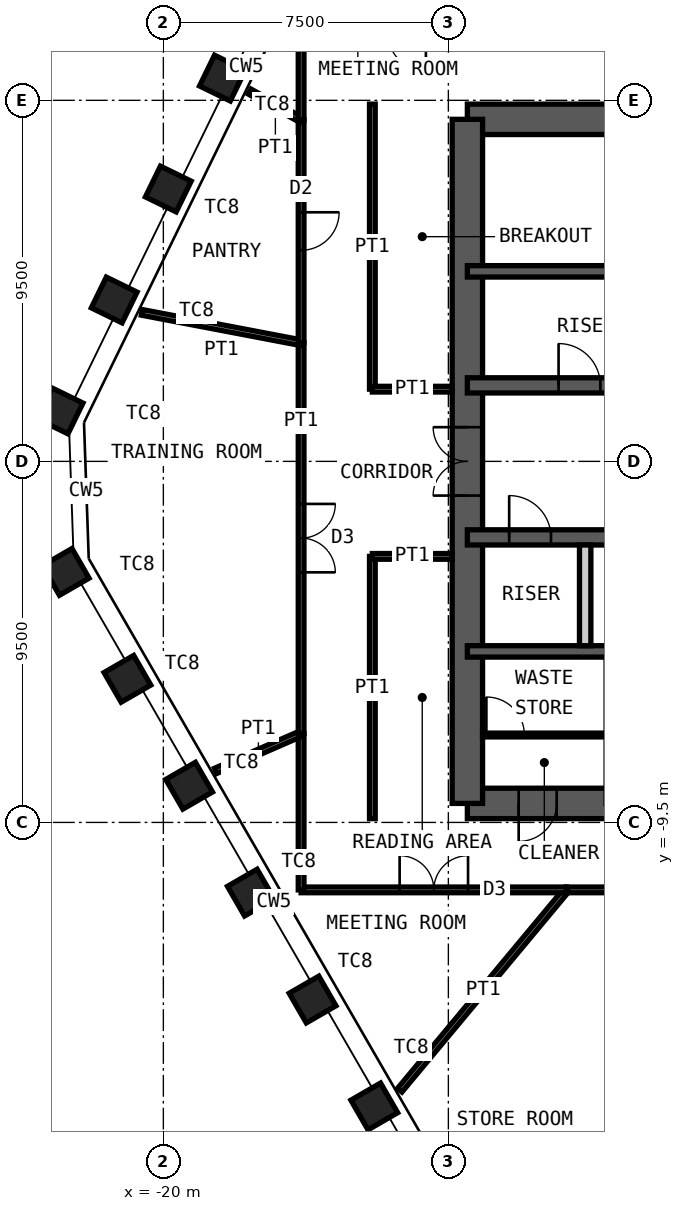
"""IFC4 building model, lengths in metres.
Left out: names, types, materials, properties, quantities, classifications, styles, units other than length and angle.
Written with IfcOpenShell. Run it as: python <this file> out.ifc"""

import sys

from ifc_helpers import new_model, si_unit, direction, frame, frame_2d, origin, origin_2d, place, context, subcontext, project, spatial, rectangle, hollow_rectangle, extrude, element, fill, save


model = new_model("IFC4")
c1 = context("Model", 3, precision=1e-05, world=origin(), true_north=direction((0.0, 1.0)))
c2 = subcontext(c1, "Body", "Model", "MODEL_VIEW")
j1 = project(units=[si_unit("LENGTHUNIT", "METRE"), si_unit("PLANEANGLEUNIT", "RADIAN")], contexts=[c1])
p1 = place(None, origin())
s1 = spatial("IfcSite", under=j1, at=p1, CompositionType="ELEMENT")
p2 = place(p1, origin())
s2 = spatial("IfcBuilding", under=s1, at=p2, CompositionType="ELEMENT")
p3 = place(p2, frame((0.0, 0.0, 308.2)))
s3 = spatial("IfcBuildingStorey", under=s2, at=p3, CompositionType="ELEMENT", Elevation=308.2)
for number, where, z_axis, x_axis in (
    (1, (-14.449, -16.973, 0.0), (0.0, 0.0, 1.0), (0.5, -0.866, 0.0)),
    (2, (-16.073, -14.16, 0.0), (0.0, 0.0, 1.0), (0.5, -0.866, 0.0)),
    (3, (-17.698, -11.347, 0.0), (0.0, 0.0, 1.0), (0.5, -0.866, 0.0)),
    (4, (-19.322, -8.534, 0.0), (0.0, 0.0, 1.0), (0.5, -0.866, 0.0)),
    (5, (-20.946, -5.721, 0.0), (0.0, 0.0, 1.0), (0.5, -0.866, 0.0)),
    (6, (-22.57, -2.908, 0.0), (0.0, 0.0, 1.0), (0.5, -0.866, 0.0)),
    (7, (-22.717, 1.327, 0.0), (0.0, 0.0, 1.0), (-0.438, -0.899, 0.0)),
    (8, (-21.293, 4.246, 0.0), (0.0, 0.0, 1.0), (-0.438, -0.899, 0.0)),
    (9, (-19.87, 7.166, 0.0), (0.0, 0.0, 1.0), (-0.438, -0.899, 0.0)),
    (10, (-18.446, 10.085, 0.0), (0.0, 0.0, 1.0), (-0.438, -0.899, 0.0)),
):
    element("IfcColumn", number, at=place(p3, frame(where, z_axis=z_axis, x_axis=x_axis)), inside=s3, PredefinedType="COLUMN", context=c2, shape_type="SweptSolid", body=[
        extrude(hollow_rectangle(XDim=0.9, YDim=0.9, WallThickness=0.05, at=origin_2d()), origin(), (0.0, 0.0, 1.0), 4.2),
    ])
p4 = place(p3, frame((-12.0, 9.0, 0.0), z_axis=(0.0, 0.0, 1.0), x_axis=(1.0, 0.0, 0.0)))
e11 = element("IfcWall", 11, at=p4, inside=s3, PredefinedType="SHEAR", context=c2, shape_type="SweptSolid", body=[
    extrude(rectangle(XDim=24.0, YDim=0.8, at=frame_2d((12.0, 0.0))), origin(), (0.0, 0.0, 1.0), 4.2),
])
p5 = place(p4, frame((10.4, 0.0, 0.0)))
e12 = element("IfcOpeningElement", 12, at=p5, cuts=e11, PredefinedType="OPENING", context=c2, shape_type="SweptSolid", body=[
    extrude(rectangle(XDim=1.0, YDim=2.1, at=frame_2d((0.5, 1.05))), frame((0.0, 0.41, 0.0), z_axis=(0.0, -1.0, 0.0), x_axis=(1.0, 0.0, 0.0)), (0.0, 0.0, 1.0), 0.82),
])
p6 = place(p4, frame((17.6, 0.0, 0.0)))
e13 = element("IfcOpeningElement", 13, at=p6, cuts=e11, PredefinedType="OPENING", context=c2, shape_type="SweptSolid", body=[
    extrude(rectangle(XDim=0.9, YDim=2.1, at=frame_2d((0.45, 1.05))), frame((0.0, 0.41, 0.0), z_axis=(0.0, -1.0, 0.0), x_axis=(1.0, 0.0, 0.0)), (0.0, 0.0, 1.0), 0.82),
])
p7 = place(p4, frame((21.9, 0.0, 0.0)))
e14 = element("IfcOpeningElement", 14, at=p7, cuts=e11, PredefinedType="OPENING", context=c2, shape_type="SweptSolid", body=[
    extrude(rectangle(XDim=0.9, YDim=2.1, at=frame_2d((0.45, 1.05))), frame((0.0, 0.41, 0.0), z_axis=(0.0, -1.0, 0.0), x_axis=(1.0, 0.0, 0.0)), (0.0, 0.0, 1.0), 0.82),
])
p8 = place(p3, frame((-12.0, -9.0, 0.0), z_axis=(0.0, 0.0, 1.0), x_axis=(1.0, 0.0, 0.0)))
e15 = element("IfcWall", 15, at=p8, inside=s3, PredefinedType="SHEAR", context=c2, shape_type="SweptSolid", body=[
    extrude(rectangle(XDim=24.0, YDim=0.8, at=frame_2d((12.0, 0.0))), origin(), (0.0, 0.0, 1.0), 4.2),
])
p9 = place(p8, frame((1.35, 0.0, 0.0)))
e16 = element("IfcOpeningElement", 16, at=p9, cuts=e15, PredefinedType="OPENING", context=c2, shape_type="SweptSolid", body=[
    extrude(rectangle(XDim=1.0, YDim=2.1, at=frame_2d((0.5, 1.05))), frame((0.0, 0.41, 0.0), z_axis=(0.0, -1.0, 0.0), x_axis=(1.0, 0.0, 0.0)), (0.0, 0.0, 1.0), 0.82),
])
p10 = place(p8, frame((5.325, 0.0, 0.0)))
e17 = element("IfcOpeningElement", 17, at=p10, cuts=e15, PredefinedType="OPENING", context=c2, shape_type="SweptSolid", body=[
    extrude(rectangle(XDim=1.15, YDim=2.1, at=frame_2d((0.575, 1.05))), frame((0.0, 0.41, 0.0), z_axis=(0.0, -1.0, 0.0), x_axis=(1.0, 0.0, 0.0)), (0.0, 0.0, 1.0), 0.82),
])
p11 = place(p8, frame((12.6, 0.0, 0.0)))
e18 = element("IfcOpeningElement", 18, at=p11, cuts=e15, PredefinedType="OPENING", context=c2, shape_type="SweptSolid", body=[
    extrude(rectangle(XDim=1.0, YDim=2.1, at=frame_2d((0.5, 1.05))), frame((0.0, 0.41, 0.0), z_axis=(0.0, -1.0, 0.0), x_axis=(1.0, 0.0, 0.0)), (0.0, 0.0, 1.0), 0.82),
])
p12 = place(p3, frame((-12.0, -9.0, 0.0), z_axis=(0.0, 0.0, 1.0), x_axis=(0.0, 1.0, 0.0)))
e19 = element("IfcWall", 19, at=p12, inside=s3, PredefinedType="SHEAR", context=c2, shape_type="SweptSolid", body=[
    extrude(rectangle(XDim=18.0, YDim=0.8, at=frame_2d((9.0, 0.0))), origin(), (0.0, 0.0, 1.0), 4.2),
])
p13 = place(p12, frame((8.1, 0.0, 0.0)))
e20 = element("IfcOpeningElement", 20, at=p13, cuts=e19, PredefinedType="OPENING", context=c2, shape_type="SweptSolid", body=[
    extrude(rectangle(XDim=1.8, YDim=2.1, at=frame_2d((0.9, 1.05))), frame((0.0, 0.41, 0.0), z_axis=(0.0, -1.0, 0.0), x_axis=(1.0, 0.0, 0.0)), (0.0, 0.0, 1.0), 0.82),
])
p14 = place(p3, frame((-12.0, 5.0, 0.0), z_axis=(0.0, 0.0, 1.0), x_axis=(1.0, 0.0, 0.0)))
e21 = element("IfcWall", 21, at=p14, inside=s3, PredefinedType="SHEAR", context=c2, shape_type="SweptSolid", body=[
    extrude(rectangle(XDim=24.0, YDim=0.3, at=frame_2d((12.0, 0.0))), origin(), (0.0, 0.0, 1.0), 4.2),
])
p15 = place(p3, frame((-12.0, 2.0, 0.0), z_axis=(0.0, 0.0, 1.0), x_axis=(1.0, 0.0, 0.0)))
e22 = element("IfcWall", 22, at=p15, inside=s3, PredefinedType="SHEAR", context=c2, shape_type="SweptSolid", body=[
    extrude(rectangle(XDim=24.0, YDim=0.4, at=frame_2d((12.0, 0.0))), origin(), (0.0, 0.0, 1.0), 4.2),
])
p16 = place(p15, frame((2.4, 0.0, 0.0)))
e23 = element("IfcOpeningElement", 23, at=p16, cuts=e22, PredefinedType="OPENING", context=c2, shape_type="SweptSolid", body=[
    extrude(rectangle(XDim=1.1, YDim=2.1, at=frame_2d((0.55, 1.05))), frame((0.0, 0.21, 0.0), z_axis=(0.0, -1.0, 0.0), x_axis=(1.0, 0.0, 0.0)), (0.0, 0.0, 1.0), 0.42),
])
p17 = place(p15, frame((22.0, 0.0, 0.0)))
e24 = element("IfcOpeningElement", 24, at=p17, cuts=e22, PredefinedType="OPENING", context=c2, shape_type="SweptSolid", body=[
    extrude(rectangle(XDim=1.1, YDim=2.1, at=frame_2d((0.55, 1.05))), frame((0.0, 0.21, 0.0), z_axis=(0.0, -1.0, 0.0), x_axis=(1.0, 0.0, 0.0)), (0.0, 0.0, 1.0), 0.42),
])
p18 = place(p15, frame((10.15, 0.0, 0.0)))
e25 = element("IfcOpeningElement", 25, at=p18, cuts=e22, PredefinedType="OPENING", context=c2, shape_type="SweptSolid", body=[
    extrude(rectangle(XDim=1.0, YDim=2.1, at=frame_2d((0.5, 1.05))), frame((0.0, 0.21, 0.0), z_axis=(0.0, -1.0, 0.0), x_axis=(1.0, 0.0, 0.0)), (0.0, 0.0, 1.0), 0.42),
])
p19 = place(p15, frame((6.9, 0.0, 0.0)))
e26 = element("IfcOpeningElement", 26, at=p19, cuts=e22, PredefinedType="OPENING", context=c2, shape_type="SweptSolid", body=[
    extrude(rectangle(XDim=1.0, YDim=2.1, at=frame_2d((0.5, 1.05))), frame((0.0, 0.21, 0.0), z_axis=(0.0, -1.0, 0.0), x_axis=(1.0, 0.0, 0.0)), (0.0, 0.0, 1.0), 0.42),
])
p20 = place(p15, frame((13.35, 0.0, 0.0)))
e27 = element("IfcOpeningElement", 27, at=p20, cuts=e22, PredefinedType="OPENING", context=c2, shape_type="SweptSolid", body=[
    extrude(rectangle(XDim=1.1, YDim=2.4, at=frame_2d((0.55, 1.2))), frame((0.0, 0.21, 0.0), z_axis=(0.0, -1.0, 0.0), x_axis=(1.0, 0.0, 0.0)), (0.0, 0.0, 1.0), 0.42),
])
p21 = place(p15, frame((16.15, 0.0, 0.0)))
e28 = element("IfcOpeningElement", 28, at=p21, cuts=e22, PredefinedType="OPENING", context=c2, shape_type="SweptSolid", body=[
    extrude(rectangle(XDim=1.1, YDim=2.4, at=frame_2d((0.55, 1.2))), frame((0.0, 0.21, 0.0), z_axis=(0.0, -1.0, 0.0), x_axis=(1.0, 0.0, 0.0)), (0.0, 0.0, 1.0), 0.42),
])
p22 = place(p15, frame((19.0, 0.0, 0.0)))
e29 = element("IfcOpeningElement", 29, at=p22, cuts=e22, PredefinedType="OPENING", context=c2, shape_type="SweptSolid", body=[
    extrude(rectangle(XDim=1.0, YDim=2.1, at=frame_2d((0.5, 1.05))), frame((0.0, 0.21, 0.0), z_axis=(0.0, -1.0, 0.0), x_axis=(1.0, 0.0, 0.0)), (0.0, 0.0, 1.0), 0.42),
])
p23 = place(p3, frame((-12.0, -2.0, 0.0), z_axis=(0.0, 0.0, 1.0), x_axis=(1.0, 0.0, 0.0)))
e30 = element("IfcWall", 30, at=p23, inside=s3, PredefinedType="SHEAR", context=c2, shape_type="SweptSolid", body=[
    extrude(rectangle(XDim=24.0, YDim=0.4, at=frame_2d((12.0, 0.0))), origin(), (0.0, 0.0, 1.0), 4.2),
])
p24 = place(p23, frame((1.1, 0.0, 0.0)))
e31 = element("IfcOpeningElement", 31, at=p24, cuts=e30, PredefinedType="OPENING", context=c2, shape_type="SweptSolid", body=[
    extrude(rectangle(XDim=1.1, YDim=2.1, at=frame_2d((0.55, 1.05))), frame((0.0, 0.21, 0.0), z_axis=(0.0, -1.0, 0.0), x_axis=(1.0, 0.0, 0.0)), (0.0, 0.0, 1.0), 0.42),
])
p25 = place(p23, frame((13.55, 0.0, 0.0)))
e32 = element("IfcOpeningElement", 32, at=p25, cuts=e30, PredefinedType="OPENING", context=c2, shape_type="SweptSolid", body=[
    extrude(rectangle(XDim=1.1, YDim=2.1, at=frame_2d((0.55, 1.05))), frame((0.0, 0.21, 0.0), z_axis=(0.0, -1.0, 0.0), x_axis=(1.0, 0.0, 0.0)), (0.0, 0.0, 1.0), 0.42),
])
p26 = place(p23, frame((20.7, 0.0, 0.0)))
e33 = element("IfcOpeningElement", 33, at=p26, cuts=e30, PredefinedType="OPENING", context=c2, shape_type="SweptSolid", body=[
    extrude(rectangle(XDim=1.1, YDim=2.1, at=frame_2d((0.55, 1.05))), frame((0.0, 0.21, 0.0), z_axis=(0.0, -1.0, 0.0), x_axis=(1.0, 0.0, 0.0)), (0.0, 0.0, 1.0), 0.42),
])
p27 = place(p23, frame((4.0, 0.0, 0.0)))
e34 = element("IfcOpeningElement", 34, at=p27, cuts=e30, PredefinedType="OPENING", context=c2, shape_type="SweptSolid", body=[
    extrude(rectangle(XDim=1.0, YDim=2.1, at=frame_2d((0.5, 1.05))), frame((0.0, 0.21, 0.0), z_axis=(0.0, -1.0, 0.0), x_axis=(1.0, 0.0, 0.0)), (0.0, 0.0, 1.0), 0.42),
])
p28 = place(p23, frame((6.8, 0.0, 0.0)))
e35 = element("IfcOpeningElement", 35, at=p28, cuts=e30, PredefinedType="OPENING", context=c2, shape_type="SweptSolid", body=[
    extrude(rectangle(XDim=1.0, YDim=2.1, at=frame_2d((0.5, 1.05))), frame((0.0, 0.21, 0.0), z_axis=(0.0, -1.0, 0.0), x_axis=(1.0, 0.0, 0.0)), (0.0, 0.0, 1.0), 0.42),
])
p29 = place(p23, frame((9.6, 0.0, 0.0)))
e36 = element("IfcOpeningElement", 36, at=p29, cuts=e30, PredefinedType="OPENING", context=c2, shape_type="SweptSolid", body=[
    extrude(rectangle(XDim=1.0, YDim=2.1, at=frame_2d((0.5, 1.05))), frame((0.0, 0.21, 0.0), z_axis=(0.0, -1.0, 0.0), x_axis=(1.0, 0.0, 0.0)), (0.0, 0.0, 1.0), 0.42),
])
p30 = place(p3, frame((-12.0, -5.0, 0.0), z_axis=(0.0, 0.0, 1.0), x_axis=(1.0, 0.0, 0.0)))
e37 = element("IfcWall", 37, at=p30, inside=s3, PredefinedType="SHEAR", context=c2, shape_type="SweptSolid", body=[
    extrude(rectangle(XDim=24.0, YDim=0.3, at=frame_2d((12.0, 0.0))), origin(), (0.0, 0.0, 1.0), 4.2),
])
p31 = place(p3, frame((-8.9, -4.85, 0.0), z_axis=(0.0, 0.0, 1.0), x_axis=(0.0, 1.0, 0.0)))
e38 = element("IfcWall", 38, at=p31, inside=s3, PredefinedType="PARTITIONING", context=c2, shape_type="SweptSolid", body=[
    extrude(rectangle(XDim=2.65, YDim=0.3, at=frame_2d((1.325, 0.0))), origin(), (0.0, 0.0, 1.0), 3.98),
])
p32 = place(p3, frame((-11.6, -7.2, 0.0), z_axis=(0.0, 0.0, 1.0), x_axis=(1.0, 0.0, 0.0)))
e39 = element("IfcWall", 39, at=p32, inside=s3, PredefinedType="PARTITIONING", context=c2, shape_type="SweptSolid", body=[
    extrude(rectangle(XDim=3.25, YDim=0.1, at=frame_2d((1.625, 0.0))), origin(), (0.0, 0.0, 1.0), 3.98),
])
p33 = place(p32, frame((0.1, 0.0, 0.0)))
e40 = element("IfcOpeningElement", 40, at=p33, cuts=e39, PredefinedType="OPENING", context=c2, shape_type="SweptSolid", body=[
    extrude(rectangle(XDim=1.0, YDim=2.4, at=frame_2d((0.5, 1.2))), frame((0.0, 0.06, 0.0), z_axis=(0.0, -1.0, 0.0), x_axis=(1.0, 0.0, 0.0)), (0.0, 0.0, 1.0), 0.12),
])
p34 = place(p3, frame((-9.24, -20.907, 0.0), z_axis=(0.0, 0.0, 1.0), x_axis=(0.404227449851, 0.91465849845, 0.0)))
e41 = element("IfcWall", 41, at=p34, inside=s3, PredefinedType="PARTITIONING", context=c2, shape_type="SweptSolid", body=[
    extrude(rectangle(XDim=10.531, YDim=0.15, at=frame_2d((5.265, 0.0))), origin(), (0.0, 0.0, 1.0), 2.93),
])
p35 = place(p3, frame((-4.983, -11.275, 0.0), z_axis=(0.0, 0.0, 1.0), x_axis=(-1.0, 0.0, 0.0)))
e42 = element("IfcWall", 42, at=p35, inside=s3, PredefinedType="PARTITIONING", context=c2, shape_type="SweptSolid", body=[
    extrude(rectangle(XDim=4.407, YDim=0.15, at=frame_2d((2.203, 0.0))), origin(), (0.0, 0.0, 1.0), 4.03),
])
p36 = place(p35, frame((1.703, 0.0, 0.0)))
e43 = element("IfcOpeningElement", 43, at=p36, cuts=e42, PredefinedType="OPENING", context=c2, shape_type="SweptSolid", body=[
    extrude(rectangle(XDim=1.0, YDim=2.4, at=frame_2d((0.5, 1.2))), frame((0.0, 0.085, 0.0), z_axis=(0.0, -1.0, 0.0), x_axis=(1.0, 0.0, 0.0)), (0.0, 0.0, 1.0), 0.17),
])
p37 = place(p3, frame((-13.779, -16.546, 0.0), z_axis=(0.0, 0.0, 1.0), x_axis=(0.639921807512, 0.768440030367, 0.0)))
e44 = element("IfcWall", 44, at=p37, inside=s3, PredefinedType="PARTITIONING", context=c2, shape_type="SweptSolid", body=[
    extrude(rectangle(XDim=6.86, YDim=0.15, at=frame_2d((3.43, 0.0))), origin(), (0.0, 0.0, 1.0), 4.03),
])
p38 = place(p3, frame((-9.39, -11.275, 0.0), z_axis=(0.0, 0.0, 1.0), x_axis=(-1.0, 0.0, 0.0)))
e45 = element("IfcWall", 45, at=p38, inside=s3, PredefinedType="PARTITIONING", context=c2, shape_type="SweptSolid", body=[
    extrude(rectangle(XDim=6.985, YDim=0.15, at=frame_2d((3.493, 0.0))), origin(), (0.0, 0.0, 1.0), 4.03),
])
p39 = place(p38, frame((2.593, 0.0, 0.0)))
e46 = element("IfcOpeningElement", 46, at=p39, cuts=e45, PredefinedType="OPENING", context=c2, shape_type="SweptSolid", body=[
    extrude(rectangle(XDim=1.8, YDim=2.4, at=frame_2d((0.9, 1.2))), frame((0.0, 0.085, 0.0), z_axis=(0.0, -1.0, 0.0), x_axis=(1.0, 0.0, 0.0)), (0.0, 0.0, 1.0), 0.17),
])
p40 = place(p3, frame((-16.375, -11.275, 0.0), z_axis=(0.0, 0.0, 1.0), x_axis=(0.0, 1.0, 0.0)))
e47 = element("IfcWall", 47, at=p40, inside=s3, PredefinedType="PARTITIONING", context=c2, shape_type="SweptSolid", body=[
    extrude(rectangle(XDim=4.114, YDim=0.15, at=frame_2d((2.057, 0.0))), origin(), (0.0, 0.0, 1.0), 4.03),
])
p41 = place(p3, frame((-18.624, -8.144, 0.0), z_axis=(0.0, 0.0, 1.0), x_axis=(0.916207556777, 0.400704021574, 0.0)))
e48 = element("IfcWall", 48, at=p41, inside=s3, PredefinedType="PARTITIONING", context=c2, shape_type="SweptSolid", body=[
    extrude(rectangle(XDim=2.454, YDim=0.15, at=frame_2d((1.227, 0.0))), origin(), (0.0, 0.0, 1.0), 3.33),
])
p42 = place(p3, frame((-16.375, -7.161, 0.0), z_axis=(0.0, 0.0, 1.0), x_axis=(0.0, 1.0, 0.0)))
e49 = element("IfcWall", 49, at=p42, inside=s3, PredefinedType="PARTITIONING", context=c2, shape_type="SweptSolid", body=[
    extrude(rectangle(XDim=10.283, YDim=0.15, at=frame_2d((5.141, 0.0))), origin(), (0.0, 0.0, 1.0), 4.03),
])
p43 = place(p42, frame((4.241, 0.0, 0.0)))
e50 = element("IfcOpeningElement", 50, at=p43, cuts=e49, PredefinedType="OPENING", context=c2, shape_type="SweptSolid", body=[
    extrude(rectangle(XDim=1.8, YDim=2.4, at=frame_2d((0.9, 1.2))), frame((0.0, 0.085, 0.0), z_axis=(0.0, -1.0, 0.0), x_axis=(1.0, 0.0, 0.0)), (0.0, 0.0, 1.0), 0.17),
])
p44 = place(p3, frame((-20.566, 3.921, 0.0), z_axis=(0.0, 0.0, 1.0), x_axis=(0.982305997167, -0.187283015595, 0.0)))
e51 = element("IfcWall", 51, at=p44, inside=s3, PredefinedType="PARTITIONING", context=c2, shape_type="SweptSolid", body=[
    extrude(rectangle(XDim=4.267, YDim=0.15, at=frame_2d((2.133, 0.0))), origin(), (0.0, 0.0, 1.0), 3.33),
])
p45 = place(p3, frame((-16.375, 3.122, 0.0), z_axis=(0.0, 0.0, 1.0), x_axis=(0.0, 1.0, 0.0)))
e52 = element("IfcWall", 52, at=p45, inside=s3, PredefinedType="PARTITIONING", context=c2, shape_type="SweptSolid", body=[
    extrude(rectangle(XDim=5.865, YDim=0.15, at=frame_2d((2.933, 0.0))), origin(), (0.0, 0.0, 1.0), 4.03),
])
p46 = place(p45, frame((2.433, 0.0, 0.0)))
e53 = element("IfcOpeningElement", 53, at=p46, cuts=e52, PredefinedType="OPENING", context=c2, shape_type="SweptSolid", body=[
    extrude(rectangle(XDim=1.0, YDim=2.4, at=frame_2d((0.5, 1.2))), frame((0.0, 0.085, 0.0), z_axis=(0.0, -1.0, 0.0), x_axis=(1.0, 0.0, 0.0)), (0.0, 0.0, 1.0), 0.17),
])
p47 = place(p3, frame((-17.729, 9.73, 0.0), z_axis=(0.0, 0.0, 1.0), x_axis=(0.876636074137, -0.48115402266, 0.0)))
e54 = element("IfcWall", 54, at=p47, inside=s3, PredefinedType="PARTITIONING", context=c2, shape_type="SweptSolid", body=[
    extrude(rectangle(XDim=1.544, YDim=0.15, at=frame_2d((0.772, 0.0))), origin(), (0.0, 0.0, 1.0), 3.33),
])
p48 = place(p3, frame((-16.375, 8.987, 0.0), z_axis=(0.0, 0.0, 1.0), x_axis=(0.0, 1.0, 0.0)))
e55 = element("IfcWall", 55, at=p48, inside=s3, PredefinedType="PARTITIONING", context=c2, shape_type="SweptSolid", body=[
    extrude(rectangle(XDim=2.288, YDim=0.15, at=frame_2d((1.144, 0.0))), origin(), (0.0, 0.0, 1.0), 4.03),
])
p49 = place(p3, frame((-14.5, 1.9, 0.0), z_axis=(0.0, 0.0, 1.0), x_axis=(0.0, 1.0, 0.0)))
e56 = element("IfcWall", 56, at=p49, inside=s3, PredefinedType="PARTITIONING", context=c2, shape_type="SweptSolid", body=[
    extrude(rectangle(XDim=7.5, YDim=0.15, at=frame_2d((3.75, 0.0))), origin(), (0.0, 0.0, 1.0), 4.03),
])
p50 = place(p3, frame((-12.4, 1.9, 0.0), z_axis=(0.0, 0.0, 1.0), x_axis=(-1.0, 0.0, 0.0)))
e57 = element("IfcWall", 57, at=p50, inside=s3, PredefinedType="PARTITIONING", context=c2, shape_type="SweptSolid", body=[
    extrude(rectangle(XDim=2.1, YDim=0.15, at=frame_2d((1.05, 0.0))), origin(), (0.0, 0.0, 1.0), 3.53),
])
p51 = place(p3, frame((-14.5, -9.4, 0.0), z_axis=(0.0, 0.0, 1.0), x_axis=(0.0, 1.0, 0.0)))
e58 = element("IfcWall", 58, at=p51, inside=s3, PredefinedType="PARTITIONING", context=c2, shape_type="SweptSolid", body=[
    extrude(rectangle(XDim=6.9, YDim=0.15, at=frame_2d((3.45, 0.0))), origin(), (0.0, 0.0, 1.0), 4.03),
])
p52 = place(p3, frame((-12.4, -2.5, 0.0), z_axis=(0.0, 0.0, 1.0), x_axis=(-1.0, 0.0, 0.0)))
e59 = element("IfcWall", 59, at=p52, inside=s3, PredefinedType="PARTITIONING", context=c2, shape_type="SweptSolid", body=[
    extrude(rectangle(XDim=2.1, YDim=0.15, at=frame_2d((1.05, 0.0))), origin(), (0.0, 0.0, 1.0), 3.53),
])
p53 = place(p9, origin())
e60 = element("IfcDoor", 60, at=p53, inside=s3, OperationType="SINGLE_SWING_LEFT", PredefinedType="DOOR", context=c2, shape_type="SweptSolid", body=[
    extrude(rectangle(XDim=1.0, YDim=2.1, at=frame_2d((0.5, 1.05))), frame((0.0, 0.025, 0.0), z_axis=(0.0, -1.0, 0.0), x_axis=(1.0, 0.0, 0.0)), (0.0, 0.0, 1.0), 0.05),
])
fill(e16, e60)
p54 = place(p16, origin())
e61 = element("IfcDoor", 61, at=p54, inside=s3, OperationType="SINGLE_SWING_RIGHT", PredefinedType="DOOR", context=c2, shape_type="SweptSolid", body=[
    extrude(rectangle(XDim=1.1, YDim=2.1, at=frame_2d((0.55, 1.05))), frame((0.0, 0.025, 0.0), z_axis=(0.0, -1.0, 0.0), x_axis=(1.0, 0.0, 0.0)), (0.0, 0.0, 1.0), 0.05),
])
fill(e23, e61)
p55 = place(p24, origin())
e62 = element("IfcDoor", 62, at=p55, inside=s3, OperationType="SINGLE_SWING_RIGHT", PredefinedType="DOOR", context=c2, shape_type="SweptSolid", body=[
    extrude(rectangle(XDim=1.1, YDim=2.1, at=frame_2d((0.55, 1.05))), frame((0.0, 0.025, 0.0), z_axis=(0.0, -1.0, 0.0), x_axis=(1.0, 0.0, 0.0)), (0.0, 0.0, 1.0), 0.05),
])
fill(e31, e62)
p56 = place(p13, origin())
e63 = element("IfcDoor", 63, at=p56, inside=s3, OperationType="DOUBLE_DOOR_DOUBLE_SWING", PredefinedType="DOOR", context=c2, shape_type="SweptSolid", body=[
    extrude(rectangle(XDim=1.8, YDim=2.1, at=frame_2d((0.9, 1.05))), frame((0.0, 0.025, 0.0), z_axis=(0.0, -1.0, 0.0), x_axis=(1.0, 0.0, 0.0)), (0.0, 0.0, 1.0), 0.05),
])
fill(e20, e63)
p57 = place(p33, origin())
e64 = element("IfcDoor", 64, at=p57, inside=s3, OperationType="SINGLE_SWING_RIGHT", PredefinedType="DOOR", context=c2, shape_type="SweptSolid", body=[
    extrude(rectangle(XDim=1.0, YDim=2.4, at=frame_2d((0.5, 1.2))), frame((0.0, 0.025, 0.0), z_axis=(0.0, -1.0, 0.0), x_axis=(1.0, 0.0, 0.0)), (0.0, 0.0, 1.0), 0.05),
])
fill(e40, e64)
p58 = place(p39, origin())
e65 = element("IfcDoor", 65, at=p58, inside=s3, OperationType="DOUBLE_DOOR_DOUBLE_SWING", PredefinedType="DOOR", context=c2, shape_type="SweptSolid", body=[
    extrude(rectangle(XDim=1.8, YDim=2.4, at=frame_2d((0.9, 1.2))), frame((0.0, 0.025, 0.0), z_axis=(0.0, -1.0, 0.0), x_axis=(1.0, 0.0, 0.0)), (0.0, 0.0, 1.0), 0.05),
])
fill(e46, e65)
p59 = place(p43, origin())
e66 = element("IfcDoor", 66, at=p59, inside=s3, OperationType="DOUBLE_DOOR_DOUBLE_SWING", PredefinedType="DOOR", context=c2, shape_type="SweptSolid", body=[
    extrude(rectangle(XDim=1.8, YDim=2.4, at=frame_2d((0.9, 1.2))), frame((0.0, 0.025, 0.0), z_axis=(0.0, -1.0, 0.0), x_axis=(1.0, 0.0, 0.0)), (0.0, 0.0, 1.0), 0.05),
])
fill(e50, e66)
p60 = place(p46, origin())
e67 = element("IfcDoor", 67, at=p60, inside=s3, OperationType="SINGLE_SWING_RIGHT", PredefinedType="DOOR", context=c2, shape_type="SweptSolid", body=[
    extrude(rectangle(XDim=1.0, YDim=2.4, at=frame_2d((0.5, 1.2))), frame((0.0, 0.025, 0.0), z_axis=(0.0, -1.0, 0.0), x_axis=(1.0, 0.0, 0.0)), (0.0, 0.0, 1.0), 0.05),
])
fill(e53, e67)
save(model, sys.argv[1])
